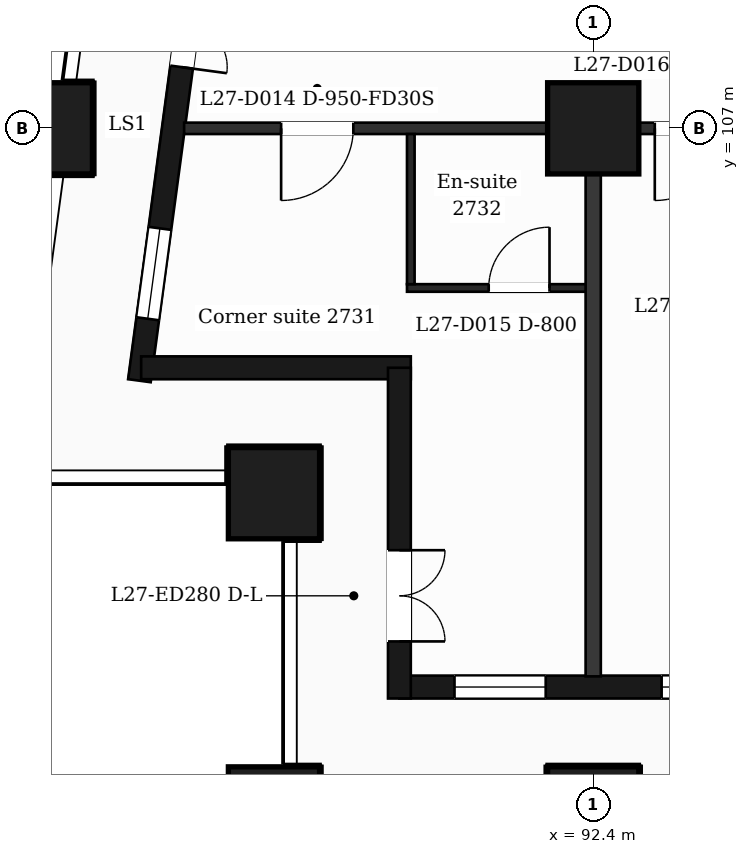
"""IFC4 building model, lengths in metres.
Left out: names, types, materials, properties, quantities, classifications, styles, units other than length and angle.
Written with IfcOpenShell. Run it as: python <this file> out.ifc"""

import sys

from ifc_helpers import new_model, si_unit, direction, frame, frame_2d, origin, origin_2d, place, context, subcontext, project, spatial, rectangle, extrude, element, fill, save


model = new_model("IFC4")
c1 = context("Model", 3, precision=1e-05, world=origin(), true_north=direction((0.0, 1.0)))
c2 = subcontext(c1, "Body", "Model", "MODEL_VIEW")
j1 = project(units=[si_unit("LENGTHUNIT", "METRE"), si_unit("PLANEANGLEUNIT", "RADIAN")], contexts=[c1])
p1 = place(None, origin())
s1 = spatial("IfcSite", under=j1, at=p1, CompositionType="ELEMENT")
p2 = place(p1, origin())
s2 = spatial("IfcBuilding", under=s1, at=p2, CompositionType="ELEMENT")
p3 = place(p2, frame((0.0, 0.0, 116.9)))
s3 = spatial("IfcBuildingStorey", under=s2, at=p3, CompositionType="ELEMENT", Elevation=116.9)
for number, where, z_axis, x_axis in (
    (1, (92.4, 98.0, 0.0), (0.0, 0.0, 1.0), (1.0, 0.0, 0.0)),
    (2, (88.2, 98.0, 0.0), (0.0, 0.0, 1.0), (1.0, 0.0, 0.0)),
    (3, (88.2, 102.2, 0.0), (0.0, 0.0, 1.0), (1.0, 0.0, 0.0)),
    (4, (92.4, 107.0, 0.0), (0.0, 0.0, 1.0), (1.0, 0.0, 0.0)),
    (5, (85.211, 107.0, 0.0), (0.0, 0.0, 1.0), (1.0, 0.0, 0.0)),
):
    element("IfcColumn", number, at=place(p3, frame(where, z_axis=z_axis, x_axis=x_axis)), inside=s3, PredefinedType="COLUMN", context=c2, shape_type="SweptSolid", body=[
        extrude(rectangle(XDim=1.2, YDim=1.2, at=origin_2d()), origin(), (0.0, 0.0, 1.0), 3.7),
    ])
p4 = place(p3, frame((89.85, 99.65, 0.0), z_axis=(0.0, 0.0, 1.0), x_axis=(1.0, 0.0, 0.0)))
e6 = element("IfcWall", 6, at=p4, inside=s3, PredefinedType="SOLIDWALL", context=c2, shape_type="SweptSolid", body=[
    extrude(rectangle(XDim=47.25, YDim=0.3, at=frame_2d((23.625, 0.0))), origin(), (0.0, 0.0, 1.0), 3.38),
])
p5 = place(p4, frame((0.725, 0.0, 0.9)))
e7 = element("IfcOpeningElement", 7, at=p5, cuts=e6, PredefinedType="OPENING", context=c2, shape_type="SweptSolid", body=[
    extrude(rectangle(XDim=1.2, YDim=2.1, at=frame_2d((0.6, 1.05))), frame((0.0, 0.16, 0.0), z_axis=(0.0, -1.0, 0.0), x_axis=(1.0, 0.0, 0.0)), (0.0, 0.0, 1.0), 0.32),
])
p6 = place(p4, frame((3.45, 0.0, 0.9)))
e8 = element("IfcOpeningElement", 8, at=p6, cuts=e6, PredefinedType="OPENING", context=c2, shape_type="SweptSolid", body=[
    extrude(rectangle(XDim=2.4, YDim=2.1, at=frame_2d((1.2, 1.05))), frame((0.0, 0.16, 0.0), z_axis=(0.0, -1.0, 0.0), x_axis=(1.0, 0.0, 0.0)), (0.0, 0.0, 1.0), 0.32),
])
p7 = place(p4, frame((7.35, 0.0, 0.0)))
e9 = element("IfcOpeningElement", 9, at=p7, cuts=e6, PredefinedType="OPENING", context=c2, shape_type="SweptSolid", body=[
    extrude(rectangle(XDim=1.2, YDim=2.4, at=frame_2d((0.6, 1.2))), frame((0.0, 0.16, 0.0), z_axis=(0.0, -1.0, 0.0), x_axis=(1.0, 0.0, 0.0)), (0.0, 0.0, 1.0), 0.32),
])
p8 = place(p4, frame((9.15, 0.0, 0.9)))
e10 = element("IfcOpeningElement", 10, at=p8, cuts=e6, PredefinedType="OPENING", context=c2, shape_type="SweptSolid", body=[
    extrude(rectangle(XDim=1.2, YDim=2.1, at=frame_2d((0.6, 1.05))), frame((0.0, 0.16, 0.0), z_axis=(0.0, -1.0, 0.0), x_axis=(1.0, 0.0, 0.0)), (0.0, 0.0, 1.0), 0.32),
])
p9 = place(p4, frame((11.85, 0.0, 0.9)))
e11 = element("IfcOpeningElement", 11, at=p9, cuts=e6, PredefinedType="OPENING", context=c2, shape_type="SweptSolid", body=[
    extrude(rectangle(XDim=2.4, YDim=2.1, at=frame_2d((1.2, 1.05))), frame((0.0, 0.16, 0.0), z_axis=(0.0, -1.0, 0.0), x_axis=(1.0, 0.0, 0.0)), (0.0, 0.0, 1.0), 0.32),
])
p10 = place(p4, frame((16.05, 0.0, 0.9)))
e12 = element("IfcOpeningElement", 12, at=p10, cuts=e6, PredefinedType="OPENING", context=c2, shape_type="SweptSolid", body=[
    extrude(rectangle(XDim=2.4, YDim=2.1, at=frame_2d((1.2, 1.05))), frame((0.0, 0.16, 0.0), z_axis=(0.0, -1.0, 0.0), x_axis=(1.0, 0.0, 0.0)), (0.0, 0.0, 1.0), 0.32),
])
p11 = place(p4, frame((20.85, 0.0, 0.9)))
e13 = element("IfcOpeningElement", 13, at=p11, cuts=e6, PredefinedType="OPENING", context=c2, shape_type="SweptSolid", body=[
    extrude(rectangle(XDim=1.2, YDim=2.1, at=frame_2d((0.6, 1.05))), frame((0.0, 0.16, 0.0), z_axis=(0.0, -1.0, 0.0), x_axis=(1.0, 0.0, 0.0)), (0.0, 0.0, 1.0), 0.32),
])
p12 = place(p4, frame((25.05, 0.0, 0.9)))
e14 = element("IfcOpeningElement", 14, at=p12, cuts=e6, PredefinedType="OPENING", context=c2, shape_type="SweptSolid", body=[
    extrude(rectangle(XDim=1.2, YDim=2.1, at=frame_2d((0.6, 1.05))), frame((0.0, 0.16, 0.0), z_axis=(0.0, -1.0, 0.0), x_axis=(1.0, 0.0, 0.0)), (0.0, 0.0, 1.0), 0.32),
])
p13 = place(p4, frame((28.65, 0.0, 0.9)))
e15 = element("IfcOpeningElement", 15, at=p13, cuts=e6, PredefinedType="OPENING", context=c2, shape_type="SweptSolid", body=[
    extrude(rectangle(XDim=2.4, YDim=2.1, at=frame_2d((1.2, 1.05))), frame((0.0, 0.16, 0.0), z_axis=(0.0, -1.0, 0.0), x_axis=(1.0, 0.0, 0.0)), (0.0, 0.0, 1.0), 0.32),
])
p14 = place(p4, frame((32.85, 0.0, 0.9)))
e16 = element("IfcOpeningElement", 16, at=p14, cuts=e6, PredefinedType="OPENING", context=c2, shape_type="SweptSolid", body=[
    extrude(rectangle(XDim=2.4, YDim=2.1, at=frame_2d((1.2, 1.05))), frame((0.0, 0.16, 0.0), z_axis=(0.0, -1.0, 0.0), x_axis=(1.0, 0.0, 0.0)), (0.0, 0.0, 1.0), 0.32),
])
p15 = place(p4, frame((37.05, 0.0, 0.9)))
e17 = element("IfcOpeningElement", 17, at=p15, cuts=e6, PredefinedType="OPENING", context=c2, shape_type="SweptSolid", body=[
    extrude(rectangle(XDim=2.4, YDim=2.1, at=frame_2d((1.2, 1.05))), frame((0.0, 0.16, 0.0), z_axis=(0.0, -1.0, 0.0), x_axis=(1.0, 0.0, 0.0)), (0.0, 0.0, 1.0), 0.32),
])
p16 = place(p4, frame((41.25, 0.0, 0.9)))
e18 = element("IfcOpeningElement", 18, at=p16, cuts=e6, PredefinedType="OPENING", context=c2, shape_type="SweptSolid", body=[
    extrude(rectangle(XDim=2.4, YDim=2.1, at=frame_2d((1.2, 1.05))), frame((0.0, 0.16, 0.0), z_axis=(0.0, -1.0, 0.0), x_axis=(1.0, 0.0, 0.0)), (0.0, 0.0, 1.0), 0.32),
])
p17 = place(p4, frame((45.25, 0.0, 0.9)))
e19 = element("IfcOpeningElement", 19, at=p17, cuts=e6, PredefinedType="OPENING", context=c2, shape_type="SweptSolid", body=[
    extrude(rectangle(XDim=1.2, YDim=2.1, at=frame_2d((0.6, 1.05))), frame((0.0, 0.16, 0.0), z_axis=(0.0, -1.0, 0.0), x_axis=(1.0, 0.0, 0.0)), (0.0, 0.0, 1.0), 0.32),
])
p18 = place(p3, frame((87.334, 110.4, 0.0), z_axis=(0.0, 0.0, 1.0), x_axis=(-0.133437175554, -0.991057273915, 0.0)))
e20 = element("IfcWall", 20, at=p18, inside=s3, PredefinedType="SOLIDWALL", context=c2, shape_type="SweptSolid", body=[
    extrude(rectangle(XDim=6.781, YDim=0.3, at=frame_2d((3.39, 0.0))), origin(), (0.0, 0.0, 1.0), 3.38),
])
p19 = place(p18, frame((1.418, 0.0, 0.0)))
e21 = element("IfcOpeningElement", 21, at=p19, cuts=e20, PredefinedType="OPENING", context=c2, shape_type="SweptSolid", body=[
    extrude(rectangle(XDim=1.2, YDim=2.4, at=frame_2d((0.6, 1.2))), frame((0.0, 0.16, 0.0), z_axis=(0.0, -1.0, 0.0), x_axis=(1.0, 0.0, 0.0)), (0.0, 0.0, 1.0), 0.32),
])
p20 = place(p18, frame((4.758, 0.0, 0.9)))
e22 = element("IfcOpeningElement", 22, at=p20, cuts=e20, PredefinedType="OPENING", context=c2, shape_type="SweptSolid", body=[
    extrude(rectangle(XDim=1.2, YDim=2.1, at=frame_2d((0.6, 1.05))), frame((0.0, 0.16, 0.0), z_axis=(0.0, -1.0, 0.0), x_axis=(1.0, 0.0, 0.0)), (0.0, 0.0, 1.0), 0.32),
])
p21 = place(p3, frame((86.452, 103.85, 0.0), z_axis=(0.0, 0.0, 1.0), x_axis=(1.0, 0.0, 0.0)))
e23 = element("IfcWall", 23, at=p21, inside=s3, PredefinedType="SOLIDWALL", context=c2, shape_type="SweptSolid", body=[
    extrude(rectangle(XDim=3.548, YDim=0.3, at=frame_2d((1.774, 0.0))), origin(), (0.0, 0.0, 1.0), 3.38),
])
p22 = place(p3, frame((89.85, 103.85, 0.0), z_axis=(0.0, 0.0, 1.0), x_axis=(0.0, -1.0, 0.0)))
e24 = element("IfcWall", 24, at=p22, inside=s3, PredefinedType="SOLIDWALL", context=c2, shape_type="SweptSolid", body=[
    extrude(rectangle(XDim=4.35, YDim=0.3, at=frame_2d((2.175, 0.0))), origin(), (0.0, 0.0, 1.0), 3.38),
])
p23 = place(p22, frame((2.4, 0.0, 0.0)))
e25 = element("IfcOpeningElement", 25, at=p23, cuts=e24, PredefinedType="OPENING", context=c2, shape_type="SweptSolid", body=[
    extrude(rectangle(XDim=1.2, YDim=2.4, at=frame_2d((0.6, 1.2))), frame((0.0, 0.16, 0.0), z_axis=(0.0, -1.0, 0.0), x_axis=(1.0, 0.0, 0.0)), (0.0, 0.0, 1.0), 0.32),
])
p24 = place(p3, frame((89.95, 104.9, 0.0), z_axis=(0.0, 0.0, 1.0), x_axis=(1.0, 0.0, 0.0)))
e26 = element("IfcWall", 26, at=p24, inside=s3, PredefinedType="PARTITIONING", context=c2, shape_type="SweptSolid", body=[
    extrude(rectangle(XDim=2.45, YDim=0.1, at=frame_2d((1.225, 0.0))), origin(), (0.0, 0.0, 1.0), 3.38),
])
p25 = place(p24, frame((1.075, 0.0, 0.0)))
e27 = element("IfcOpeningElement", 27, at=p25, cuts=e26, PredefinedType="OPENING", context=c2, shape_type="SweptSolid", body=[
    extrude(rectangle(XDim=0.8, YDim=2.1, at=frame_2d((0.4, 1.05))), frame((0.0, 0.06, 0.0), z_axis=(0.0, -1.0, 0.0), x_axis=(1.0, 0.0, 0.0)), (0.0, 0.0, 1.0), 0.12),
])
p26 = place(p3, frame((87.018, 107.0, 0.0), z_axis=(0.0, 0.0, 1.0), x_axis=(1.0, 0.0, 0.0)))
e28 = element("IfcWall", 28, at=p26, inside=s3, PredefinedType="PARTITIONING", context=c2, shape_type="SweptSolid", body=[
    extrude(rectangle(XDim=52.765, YDim=0.15, at=frame_2d((26.382, 0.0))), origin(), (0.0, 0.0, 1.0), 3.38),
])
p27 = place(p26, frame((1.276, 0.0, 0.0)))
e29 = element("IfcOpeningElement", 29, at=p27, cuts=e28, PredefinedType="OPENING", context=c2, shape_type="SweptSolid", body=[
    extrude(rectangle(XDim=0.95, YDim=2.1, at=frame_2d((0.475, 1.05))), frame((0.0, 0.085, 0.0), z_axis=(0.0, -1.0, 0.0), x_axis=(1.0, 0.0, 0.0)), (0.0, 0.0, 1.0), 0.17),
])
p28 = place(p26, frame((6.192, 0.0, 0.0)))
e30 = element("IfcOpeningElement", 30, at=p28, cuts=e28, PredefinedType="OPENING", context=c2, shape_type="SweptSolid", body=[
    extrude(rectangle(XDim=0.95, YDim=2.1, at=frame_2d((0.475, 1.05))), frame((0.0, 0.085, 0.0), z_axis=(0.0, -1.0, 0.0), x_axis=(1.0, 0.0, 0.0)), (0.0, 0.0, 1.0), 0.17),
])
p29 = place(p26, frame((11.982, 0.0, 0.0)))
e31 = element("IfcOpeningElement", 31, at=p29, cuts=e28, PredefinedType="OPENING", context=c2, shape_type="SweptSolid", body=[
    extrude(rectangle(XDim=1.0, YDim=2.1, at=frame_2d((0.5, 1.05))), frame((0.0, 0.085, 0.0), z_axis=(0.0, -1.0, 0.0), x_axis=(1.0, 0.0, 0.0)), (0.0, 0.0, 1.0), 0.17),
])
p30 = place(p26, frame((14.582, 0.0, 0.0)))
e32 = element("IfcOpeningElement", 32, at=p30, cuts=e28, PredefinedType="OPENING", context=c2, shape_type="SweptSolid", body=[
    extrude(rectangle(XDim=0.95, YDim=2.1, at=frame_2d((0.475, 1.05))), frame((0.0, 0.085, 0.0), z_axis=(0.0, -1.0, 0.0), x_axis=(1.0, 0.0, 0.0)), (0.0, 0.0, 1.0), 0.17),
])
p31 = place(p26, frame((18.257, 0.0, 0.0)))
e33 = element("IfcOpeningElement", 33, at=p31, cuts=e28, PredefinedType="OPENING", context=c2, shape_type="SweptSolid", body=[
    extrude(rectangle(XDim=0.95, YDim=2.1, at=frame_2d((0.475, 1.05))), frame((0.0, 0.085, 0.0), z_axis=(0.0, -1.0, 0.0), x_axis=(1.0, 0.0, 0.0)), (0.0, 0.0, 1.0), 0.17),
])
p32 = place(p26, frame((22.992, 0.0, 0.0)))
e34 = element("IfcOpeningElement", 34, at=p32, cuts=e28, PredefinedType="OPENING", context=c2, shape_type="SweptSolid", body=[
    extrude(rectangle(XDim=0.95, YDim=2.1, at=frame_2d((0.475, 1.05))), frame((0.0, 0.085, 0.0), z_axis=(0.0, -1.0, 0.0), x_axis=(1.0, 0.0, 0.0)), (0.0, 0.0, 1.0), 0.17),
])
p33 = place(p26, frame((26.632, 0.0, 0.0)))
e35 = element("IfcOpeningElement", 35, at=p33, cuts=e28, PredefinedType="OPENING", context=c2, shape_type="SweptSolid", body=[
    extrude(rectangle(XDim=1.0, YDim=2.1, at=frame_2d((0.5, 1.05))), frame((0.0, 0.085, 0.0), z_axis=(0.0, -1.0, 0.0), x_axis=(1.0, 0.0, 0.0)), (0.0, 0.0, 1.0), 0.17),
])
p34 = place(p26, frame((33.557, 0.0, 0.0)))
e36 = element("IfcOpeningElement", 36, at=p34, cuts=e28, PredefinedType="OPENING", context=c2, shape_type="SweptSolid", body=[
    extrude(rectangle(XDim=0.95, YDim=2.1, at=frame_2d((0.475, 1.05))), frame((0.0, 0.085, 0.0), z_axis=(0.0, -1.0, 0.0), x_axis=(1.0, 0.0, 0.0)), (0.0, 0.0, 1.0), 0.17),
])
p35 = place(p26, frame((37.182, 0.0, 0.0)))
e37 = element("IfcOpeningElement", 37, at=p35, cuts=e28, PredefinedType="OPENING", context=c2, shape_type="SweptSolid", body=[
    extrude(rectangle(XDim=0.95, YDim=2.1, at=frame_2d((0.475, 1.05))), frame((0.0, 0.085, 0.0), z_axis=(0.0, -1.0, 0.0), x_axis=(1.0, 0.0, 0.0)), (0.0, 0.0, 1.0), 0.17),
])
p36 = place(p26, frame((41.957, 0.0, 0.0)))
e38 = element("IfcOpeningElement", 38, at=p36, cuts=e28, PredefinedType="OPENING", context=c2, shape_type="SweptSolid", body=[
    extrude(rectangle(XDim=0.95, YDim=2.1, at=frame_2d((0.475, 1.05))), frame((0.0, 0.085, 0.0), z_axis=(0.0, -1.0, 0.0), x_axis=(1.0, 0.0, 0.0)), (0.0, 0.0, 1.0), 0.17),
])
p37 = place(p26, frame((45.622, 0.0, 0.0)))
e39 = element("IfcOpeningElement", 39, at=p37, cuts=e28, PredefinedType="OPENING", context=c2, shape_type="SweptSolid", body=[
    extrude(rectangle(XDim=0.95, YDim=2.1, at=frame_2d((0.475, 1.05))), frame((0.0, 0.085, 0.0), z_axis=(0.0, -1.0, 0.0), x_axis=(1.0, 0.0, 0.0)), (0.0, 0.0, 1.0), 0.17),
])
p38 = place(p26, frame((48.56, 0.0, 0.0)))
e40 = element("IfcOpeningElement", 40, at=p38, cuts=e28, PredefinedType="OPENING", context=c2, shape_type="SweptSolid", body=[
    extrude(rectangle(XDim=0.95, YDim=2.1, at=frame_2d((0.475, 1.05))), frame((0.0, 0.085, 0.0), z_axis=(0.0, -1.0, 0.0), x_axis=(1.0, 0.0, 0.0)), (0.0, 0.0, 1.0), 0.17),
])
p39 = place(p3, frame((90.0, 104.95, 0.0), z_axis=(0.0, 0.0, 1.0), x_axis=(0.0, 1.0, 0.0)))
e41 = element("IfcWall", 41, at=p39, inside=s3, PredefinedType="PARTITIONING", context=c2, shape_type="SweptSolid", body=[
    extrude(rectangle(XDim=1.975, YDim=0.1, at=frame_2d((0.988, 0.0))), origin(), (0.0, 0.0, 1.0), 3.38),
])
p40 = place(p3, frame((92.4, 99.79, 0.0), z_axis=(0.0, 0.0, 1.0), x_axis=(0.0, 1.0, 0.0)))
e42 = element("IfcWall", 42, at=p40, inside=s3, PredefinedType="PARTITIONING", context=c2, shape_type="SweptSolid", body=[
    extrude(rectangle(XDim=7.135, YDim=0.2, at=frame_2d((3.567, 0.0))), origin(), (0.0, 0.0, 1.0), 3.38),
])
p41 = place(p5, origin())
e43 = element("IfcWindow", 43, at=p41, inside=s3, PartitioningType="SINGLE_PANEL", PredefinedType="WINDOW", context=c2, shape_type="SweptSolid", body=[
    extrude(rectangle(XDim=1.2, YDim=2.1, at=frame_2d((0.6, 1.05))), frame((0.0, 0.03, 0.0), z_axis=(0.0, -1.0, 0.0), x_axis=(1.0, 0.0, 0.0)), (0.0, 0.0, 1.0), 0.06),
])
fill(e7, e43)
p42 = place(p6, origin())
e44 = element("IfcWindow", 44, at=p42, inside=s3, PartitioningType="SINGLE_PANEL", PredefinedType="WINDOW", context=c2, shape_type="SweptSolid", body=[
    extrude(rectangle(XDim=2.4, YDim=2.1, at=frame_2d((1.2, 1.05))), frame((0.0, 0.03, 0.0), z_axis=(0.0, -1.0, 0.0), x_axis=(1.0, 0.0, 0.0)), (0.0, 0.0, 1.0), 0.06),
])
fill(e8, e44)
p43 = place(p19, origin())
e45 = element("IfcDoor", 45, at=p43, inside=s3, OperationType="DOUBLE_DOOR_SINGLE_SWING", PredefinedType="DOOR", context=c2, shape_type="SweptSolid", body=[
    extrude(rectangle(XDim=1.2, YDim=2.4, at=frame_2d((0.6, 1.2))), frame((0.0, 0.025, 0.0), z_axis=(0.0, -1.0, 0.0), x_axis=(1.0, 0.0, 0.0)), (0.0, 0.0, 1.0), 0.05),
])
fill(e21, e45)
p44 = place(p20, origin())
e46 = element("IfcWindow", 46, at=p44, inside=s3, PartitioningType="SINGLE_PANEL", PredefinedType="WINDOW", context=c2, shape_type="SweptSolid", body=[
    extrude(rectangle(XDim=1.2, YDim=2.1, at=frame_2d((0.6, 1.05))), frame((0.0, 0.03, 0.0), z_axis=(0.0, -1.0, 0.0), x_axis=(1.0, 0.0, 0.0)), (0.0, 0.0, 1.0), 0.06),
])
fill(e22, e46)
p45 = place(p23, origin())
e47 = element("IfcDoor", 47, at=p45, inside=s3, OperationType="DOUBLE_DOOR_SINGLE_SWING", PredefinedType="DOOR", context=c2, shape_type="SweptSolid", body=[
    extrude(rectangle(XDim=1.2, YDim=2.4, at=frame_2d((0.6, 1.2))), frame((0.0, 0.025, 0.0), z_axis=(0.0, -1.0, 0.0), x_axis=(1.0, 0.0, 0.0)), (0.0, 0.0, 1.0), 0.05),
])
fill(e25, e47)
p46 = place(p27, origin())
e48 = element("IfcDoor", 48, at=p46, inside=s3, OperationType="SINGLE_SWING_LEFT", PredefinedType="DOOR", context=c2, shape_type="SweptSolid", body=[
    extrude(rectangle(XDim=0.95, YDim=2.1, at=frame_2d((0.475, 1.05))), frame((0.0, 0.025, 0.0), z_axis=(0.0, -1.0, 0.0), x_axis=(1.0, 0.0, 0.0)), (0.0, 0.0, 1.0), 0.05),
])
fill(e29, e48)
p47 = place(p25, origin())
e49 = element("IfcDoor", 49, at=p47, inside=s3, OperationType="SINGLE_SWING_RIGHT", PredefinedType="DOOR", context=c2, shape_type="SweptSolid", body=[
    extrude(rectangle(XDim=0.8, YDim=2.1, at=frame_2d((0.4, 1.05))), frame((0.0, 0.025, 0.0), z_axis=(0.0, -1.0, 0.0), x_axis=(1.0, 0.0, 0.0)), (0.0, 0.0, 1.0), 0.05),
])
fill(e27, e49)
p48 = place(p28, origin())
e50 = element("IfcDoor", 50, at=p48, inside=s3, OperationType="SINGLE_SWING_LEFT", PredefinedType="DOOR", context=c2, shape_type="SweptSolid", body=[
    extrude(rectangle(XDim=0.95, YDim=2.1, at=frame_2d((0.475, 1.05))), frame((0.0, 0.025, 0.0), z_axis=(0.0, -1.0, 0.0), x_axis=(1.0, 0.0, 0.0)), (0.0, 0.0, 1.0), 0.05),
])
fill(e30, e50)
save(model, sys.argv[1])
